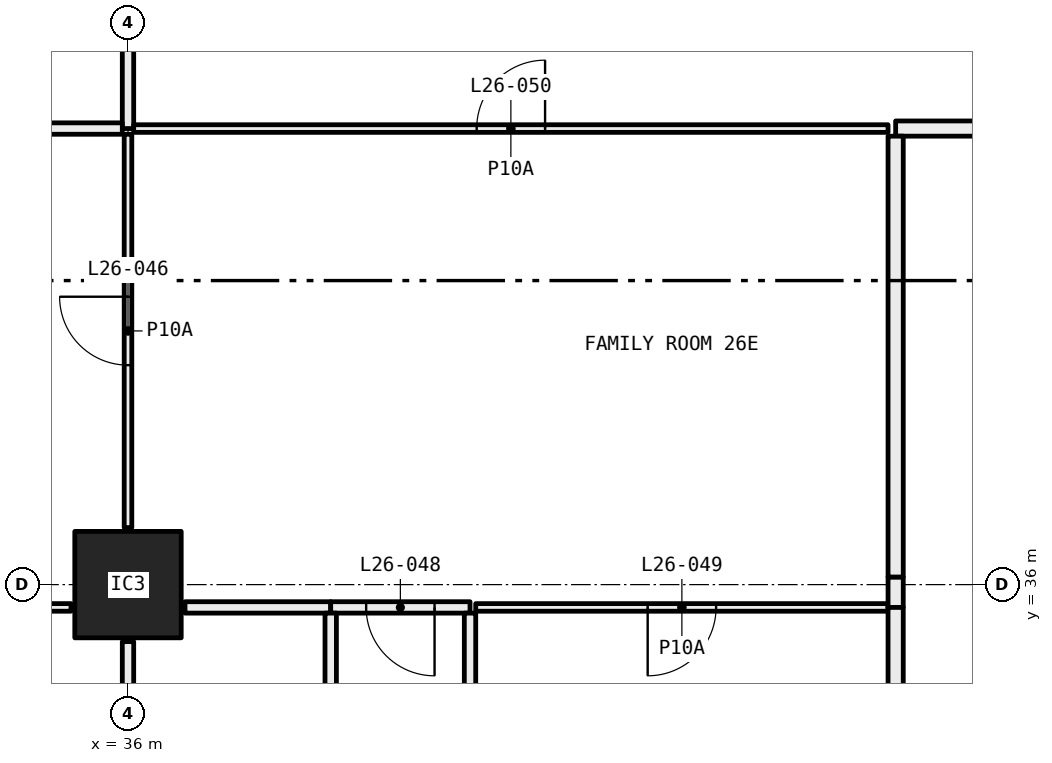
"""IFC4 building model, lengths in metres.
Left out: names, types, materials, properties, quantities, classifications, styles, units other than length and angle.
Written with IfcOpenShell. Run it as: python <this file> out.ifc"""

import sys

from ifc_helpers import new_model, si_unit, direction, frame, frame_2d, origin, origin_2d, place, context, subcontext, project, spatial, rectangle, hollow_rectangle, extrude, element, fill, save


model = new_model("IFC4")
c1 = context("Model", 3, precision=1e-05, world=origin(), true_north=direction((0.0, 1.0)))
c2 = subcontext(c1, "Body", "Model", "MODEL_VIEW")
j1 = project(units=[si_unit("LENGTHUNIT", "METRE"), si_unit("PLANEANGLEUNIT", "RADIAN")], contexts=[c1])
p1 = place(None, origin())
s1 = spatial("IfcSite", under=j1, at=p1, CompositionType="ELEMENT")
p2 = place(p1, origin())
s2 = spatial("IfcBuilding", under=s1, at=p2, CompositionType="ELEMENT")
p3 = place(p2, frame((0.0, 0.0, 103.5)))
s3 = spatial("IfcBuildingStorey", under=s2, at=p3, CompositionType="ELEMENT", Elevation=103.5)
p4 = place(p3, frame((36.0, 36.0, 0.0), z_axis=(0.0, 0.0, 1.0), x_axis=(1.0, 0.0, 0.0)))
e1 = element("IfcColumn", 1, at=p4, inside=s3, PredefinedType="COLUMN", context=c2, shape_type="SweptSolid", body=[
    extrude(hollow_rectangle(XDim=1.4, YDim=1.4, WallThickness=0.06, at=origin_2d()), origin(), (0.0, 0.0, 1.0), 3.05),
])
p5 = place(p3, frame((36.0, 42.0, 0.0), z_axis=(0.0, 0.0, 1.0), x_axis=(0.0, 1.0, 0.0)))
e2 = element("IfcWall", 2, at=p5, inside=s3, PredefinedType="PARTITIONING", context=c2, shape_type="SweptSolid", body=[
    extrude(rectangle(XDim=1.605, YDim=0.15, at=frame_2d((0.802, 0.0))), origin(), (0.0, 0.0, 1.0), 2.45),
])
p6 = place(p3, frame((31.5, 42.0, 0.0), z_axis=(0.0, 0.0, 1.0), x_axis=(1.0, 0.0, 0.0)))
e3 = element("IfcWall", 3, at=p6, inside=s3, PredefinedType="PARTITIONING", context=c2, shape_type="SweptSolid", body=[
    extrude(rectangle(XDim=4.425, YDim=0.15, at=frame_2d((2.212, 0.0))), origin(), (0.0, 0.0, 1.0), 2.45),
])
p7 = place(p3, frame((36.075, 42.0, 0.0), z_axis=(0.0, 0.0, 1.0), x_axis=(1.0, 0.0, 0.0)))
e4 = element("IfcWall", 4, at=p7, inside=s3, PredefinedType="PARTITIONING", context=c2, shape_type="SweptSolid", body=[
    extrude(rectangle(XDim=9.925, YDim=0.1, at=frame_2d((4.962, 0.0))), origin(), (0.0, 0.0, 1.0), 2.45),
])
p8 = place(p7, frame((4.512, 0.0, 0.0)))
e5 = element("IfcOpeningElement", 5, at=p8, cuts=e4, PredefinedType="OPENING", context=c2, shape_type="SweptSolid", body=[
    extrude(rectangle(XDim=0.9, YDim=2.1, at=frame_2d((0.45, 1.05))), frame((0.0, 0.06, 0.0), z_axis=(0.0, -1.0, 0.0), x_axis=(1.0, 0.0, 0.0)), (0.0, 0.0, 1.0), 0.12),
])
p9 = place(p3, frame((46.1, 42.0, 0.0), z_axis=(0.0, 0.0, 1.0), x_axis=(1.0, 0.0, 0.0)))
e6 = element("IfcWall", 6, at=p9, inside=s3, PredefinedType="PARTITIONING", context=c2, shape_type="SweptSolid", body=[
    extrude(rectangle(XDim=7.9, YDim=0.2, at=frame_2d((3.95, 0.0))), origin(), (0.0, 0.0, 1.0), 3.05),
])
p10 = place(p3, frame((31.55, 35.7, 0.0), z_axis=(0.0, 0.0, 1.0), x_axis=(1.0, 0.0, 0.0)))
e7 = element("IfcWall", 7, at=p10, inside=s3, PredefinedType="PARTITIONING", context=c2, shape_type="SweptSolid", body=[
    extrude(rectangle(XDim=3.7, YDim=0.1, at=frame_2d((1.85, 0.0))), origin(), (0.0, 0.0, 1.0), 3.05),
])
p11 = place(p10, frame((1.4, 0.0, 0.0)))
e8 = element("IfcOpeningElement", 8, at=p11, cuts=e7, PredefinedType="OPENING", context=c2, shape_type="SweptSolid", body=[
    extrude(rectangle(XDim=0.9, YDim=2.1, at=frame_2d((0.45, 1.05))), frame((0.0, 0.06, 0.0), z_axis=(0.0, -1.0, 0.0), x_axis=(1.0, 0.0, 0.0)), (0.0, 0.0, 1.0), 0.12),
])
p12 = place(p3, frame((36.0, 36.75, 0.0), z_axis=(0.0, 0.0, 1.0), x_axis=(0.0, 1.0, 0.0)))
e9 = element("IfcWall", 9, at=p12, inside=s3, PredefinedType="PARTITIONING", context=c2, shape_type="SweptSolid", body=[
    extrude(rectangle(XDim=5.175, YDim=0.1, at=frame_2d((2.587, 0.0))), origin(), (0.0, 0.0, 1.0), 2.45),
])
p13 = place(p12, frame((2.137, 0.0, 0.0)))
e10 = element("IfcOpeningElement", 10, at=p13, cuts=e9, PredefinedType="OPENING", context=c2, shape_type="SweptSolid", body=[
    extrude(rectangle(XDim=0.9, YDim=2.1, at=frame_2d((0.45, 1.05))), frame((0.0, 0.06, 0.0), z_axis=(0.0, -1.0, 0.0), x_axis=(1.0, 0.0, 0.0)), (0.0, 0.0, 1.0), 0.12),
])
p14 = place(p3, frame((36.0, 31.3, 0.0), z_axis=(0.0, 0.0, 1.0), x_axis=(0.0, 1.0, 0.0)))
e11 = element("IfcWall", 11, at=p14, inside=s3, PredefinedType="PARTITIONING", context=c2, shape_type="SweptSolid", body=[
    extrude(rectangle(XDim=3.95, YDim=0.15, at=frame_2d((1.975, 0.0))), origin(), (0.0, 0.0, 1.0), 2.45),
])
p15 = place(p14, frame((1.525, 0.0, 0.0)))
e12 = element("IfcOpeningElement", 12, at=p15, cuts=e11, PredefinedType="OPENING", context=c2, shape_type="SweptSolid", body=[
    extrude(rectangle(XDim=0.9, YDim=2.1, at=frame_2d((0.45, 1.05))), frame((0.0, 0.085, 0.0), z_axis=(0.0, -1.0, 0.0), x_axis=(1.0, 0.0, 0.0)), (0.0, 0.0, 1.0), 0.17),
])
p16 = place(p3, frame((36.75, 35.7, 0.0), z_axis=(0.0, 0.0, 1.0), x_axis=(1.0, 0.0, 0.0)))
e13 = element("IfcWall", 13, at=p16, inside=s3, PredefinedType="PARTITIONING", context=c2, shape_type="SweptSolid", body=[
    extrude(rectangle(XDim=1.917, YDim=0.15, at=frame_2d((0.958, 0.0))), origin(), (0.0, 0.0, 1.0), 3.05),
])
p17 = place(p3, frame((38.667, 35.7, 0.0), z_axis=(0.0, 0.0, 1.0), x_axis=(1.0, 0.0, 0.0)))
e14 = element("IfcWall", 14, at=p17, inside=s3, PredefinedType="PARTITIONING", context=c2, shape_type="SweptSolid", body=[
    extrude(rectangle(XDim=1.833, YDim=0.15, at=frame_2d((0.917, 0.0))), origin(), (0.0, 0.0, 1.0), 3.05),
])
p18 = place(p17, frame((0.467, 0.0, 0.0)))
e15 = element("IfcOpeningElement", 15, at=p18, cuts=e14, PredefinedType="OPENING", context=c2, shape_type="SweptSolid", body=[
    extrude(rectangle(XDim=0.9, YDim=2.1, at=frame_2d((0.45, 1.05))), frame((0.0, 0.085, 0.0), z_axis=(0.0, -1.0, 0.0), x_axis=(1.0, 0.0, 0.0)), (0.0, 0.0, 1.0), 0.17),
])
p19 = place(p3, frame((40.575, 35.7, 0.0), z_axis=(0.0, 0.0, 1.0), x_axis=(1.0, 0.0, 0.0)))
e16 = element("IfcWall", 16, at=p19, inside=s3, PredefinedType="PARTITIONING", context=c2, shape_type="SweptSolid", body=[
    extrude(rectangle(XDim=5.425, YDim=0.1, at=frame_2d((2.712, 0.0))), origin(), (0.0, 0.0, 1.0), 3.05),
])
p20 = place(p19, frame((2.262, 0.0, 0.0)))
e17 = element("IfcOpeningElement", 17, at=p20, cuts=e16, PredefinedType="OPENING", context=c2, shape_type="SweptSolid", body=[
    extrude(rectangle(XDim=0.9, YDim=2.1, at=frame_2d((0.45, 1.05))), frame((0.0, 0.06, 0.0), z_axis=(0.0, -1.0, 0.0), x_axis=(1.0, 0.0, 0.0)), (0.0, 0.0, 1.0), 0.12),
])
p21 = place(p3, frame((46.1, 35.7, 0.0), z_axis=(0.0, 0.0, 1.0), x_axis=(0.0, 1.0, 0.0)))
e18 = element("IfcWall", 18, at=p21, inside=s3, PredefinedType="PARTITIONING", context=c2, shape_type="SweptSolid", body=[
    extrude(rectangle(XDim=0.4, YDim=0.2, at=frame_2d((0.2, 0.0))), origin(), (0.0, 0.0, 1.0), 2.45),
])
p22 = place(p3, frame((46.1, 36.1, 0.0), z_axis=(0.0, 0.0, 1.0), x_axis=(0.0, 1.0, 0.0)))
e19 = element("IfcWall", 19, at=p22, inside=s3, PredefinedType="PARTITIONING", context=c2, shape_type="SweptSolid", body=[
    extrude(rectangle(XDim=5.8, YDim=0.2, at=frame_2d((2.9, 0.0))), origin(), (0.0, 0.0, 1.0), 3.05),
])
for number, where, z_axis, x_axis in (
    (20, (38.667, 31.3, 0.0), (0.0, 0.0, 1.0), (0.0, 1.0, 0.0)),
    (21, (40.5, 31.3, 0.0), (0.0, 0.0, 1.0), (0.0, 1.0, 0.0)),
):
    element("IfcWall", number, at=place(p3, frame(where, z_axis=z_axis, x_axis=x_axis)), inside=s3, PredefinedType="PARTITIONING", context=c2, shape_type="SweptSolid", body=[
        extrude(rectangle(XDim=4.325, YDim=0.15, at=frame_2d((2.163, 0.0))), origin(), (0.0, 0.0, 1.0), 3.05),
    ])
p23 = place(p3, frame((46.1, 31.3, 0.0), z_axis=(0.0, 0.0, 1.0), x_axis=(0.0, 1.0, 0.0)))
e22 = element("IfcWall", 22, at=p23, inside=s3, PredefinedType="PARTITIONING", context=c2, shape_type="SweptSolid", body=[
    extrude(rectangle(XDim=4.4, YDim=0.2, at=frame_2d((2.2, 0.0))), origin(), (0.0, 0.0, 1.0), 3.05),
])
p24 = place(p13, origin())
e23 = element("IfcDoor", 23, at=p24, inside=s3, OperationType="SINGLE_SWING_LEFT", PredefinedType="DOOR", context=c2, shape_type="SweptSolid", body=[
    extrude(rectangle(XDim=0.9, YDim=2.1, at=frame_2d((0.45, 1.05))), frame((0.0, 0.025, 0.0), z_axis=(0.0, -1.0, 0.0), x_axis=(1.0, 0.0, 0.0)), (0.0, 0.0, 1.0), 0.05),
])
fill(e10, e23)
p25 = place(p18, frame((0.9, 0.0, 0.0), x_axis=(-1.0, 0.0, 0.0)))
e24 = element("IfcDoor", 24, at=p25, inside=s3, OperationType="SINGLE_SWING_RIGHT", PredefinedType="DOOR", context=c2, shape_type="SweptSolid", body=[
    extrude(rectangle(XDim=0.9, YDim=2.1, at=frame_2d((0.45, 1.05))), frame((0.0, 0.025, 0.0), z_axis=(0.0, -1.0, 0.0), x_axis=(1.0, 0.0, 0.0)), (0.0, 0.0, 1.0), 0.05),
])
fill(e15, e24)
p26 = place(p20, frame((0.9, 0.0, 0.0), x_axis=(-1.0, 0.0, 0.0)))
e25 = element("IfcDoor", 25, at=p26, inside=s3, OperationType="SINGLE_SWING_LEFT", PredefinedType="DOOR", context=c2, shape_type="SweptSolid", body=[
    extrude(rectangle(XDim=0.9, YDim=2.1, at=frame_2d((0.45, 1.05))), frame((0.0, 0.025, 0.0), z_axis=(0.0, -1.0, 0.0), x_axis=(1.0, 0.0, 0.0)), (0.0, 0.0, 1.0), 0.05),
])
fill(e17, e25)
p27 = place(p8, origin())
e26 = element("IfcDoor", 26, at=p27, inside=s3, OperationType="SINGLE_SWING_LEFT", PredefinedType="DOOR", context=c2, shape_type="SweptSolid", body=[
    extrude(rectangle(XDim=0.9, YDim=2.1, at=frame_2d((0.45, 1.05))), frame((0.0, 0.025, 0.0), z_axis=(0.0, -1.0, 0.0), x_axis=(1.0, 0.0, 0.0)), (0.0, 0.0, 1.0), 0.05),
])
fill(e5, e26)
save(model, sys.argv[1])
